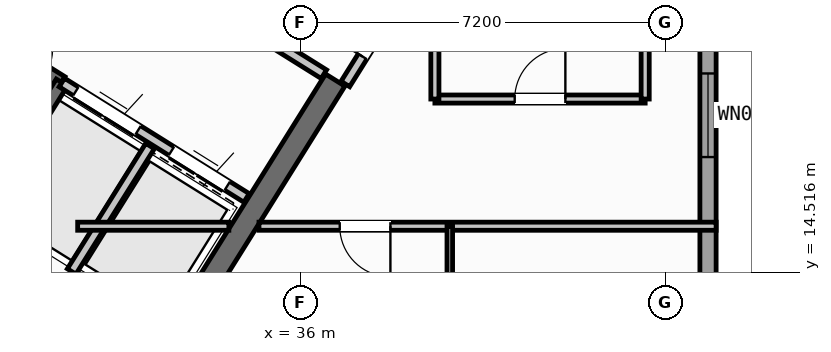
"""IFC4 building model, lengths in metres.
Left out: names, types, materials, properties, quantities, classifications, styles, units other than length and angle.
Written with IfcOpenShell. Run it as: python <this file> out.ifc"""

import sys

from ifc_helpers import new_model, si_unit, direction, frame, frame_2d, origin, place, context, subcontext, project, spatial, rectangle, extrude, source, transform, mapped, element, fill, save


model = new_model("IFC4")
c1 = context("Model", 3, precision=1e-05, world=origin(), true_north=direction((0.0, 1.0)))
c2 = subcontext(c1, "Body", "Model", "MODEL_VIEW")
j1 = project(units=[si_unit("LENGTHUNIT", "METRE"), si_unit("PLANEANGLEUNIT", "RADIAN")], contexts=[c1])
p1 = place(None, origin())
s1 = spatial("IfcSite", under=j1, at=p1, CompositionType="ELEMENT")
p2 = place(p1, origin())
s2 = spatial("IfcBuilding", under=s1, at=p2, CompositionType="ELEMENT")
p3 = place(p2, frame((0.0, 0.0, 277.2)))
s3 = spatial("IfcBuildingStorey", under=s2, at=p3, CompositionType="ELEMENT", Elevation=277.2)
p4 = place(p3, frame((33.324, 12.503, 0.0), z_axis=(0.0, 0.0, 1.0), x_axis=(-0.848043529849, 0.529926571782, 0.0)))
e1 = element("IfcWall", 1, at=p4, inside=s3, PredefinedType="SHEAR", context=c2, shape_type="SweptSolid", body=[
    extrude(rectangle(XDim=13.04, YDim=0.45, at=frame_2d((6.52, 0.0))), origin(), (0.0, 0.0, 1.0), 3.35),
])
p5 = place(p3, frame((36.683, 18.304, 0.0), z_axis=(0.0, 0.0, 1.0), x_axis=(-0.529904039071, -0.848057609704, 0.0)))
e2 = element("IfcWall", 2, at=p5, inside=s3, PredefinedType="SHEAR", context=c2, shape_type="SweptSolid", body=[
    extrude(rectangle(XDim=6.475, YDim=0.45, at=frame_2d((3.238, 0.0))), origin(), (0.0, 0.0, 1.0), 3.35),
])
p6 = place(p3, frame((44.04, 23.04, 0.0), z_axis=(0.0, 0.0, 1.0), x_axis=(0.0, -1.0, 0.0)))
e3 = element("IfcWall", 3, at=p6, inside=s3, PredefinedType="STANDARD", context=c2, shape_type="SweptSolid", body=[
    extrude(rectangle(XDim=21.08, YDim=0.32, at=frame_2d((10.54, 0.0))), origin(), (0.0, 0.0, 1.0), 3.35),
])
p7 = place(p6, frame((1.285, 0.0, 0.9)))
e4 = element("IfcOpeningElement", 4, at=p7, cuts=e3, PredefinedType="OPENING", context=c2, shape_type="SweptSolid", body=[
    extrude(rectangle(XDim=1.65, YDim=1.45, at=frame_2d((0.825, 0.725))), frame((0.0, 0.17, 0.0), z_axis=(0.0, -1.0, 0.0), x_axis=(1.0, 0.0, 0.0)), (0.0, 0.0, 1.0), 0.34),
])
p8 = place(p6, frame((4.605, 0.0, 0.9)))
e5 = element("IfcOpeningElement", 5, at=p8, cuts=e3, PredefinedType="OPENING", context=c2, shape_type="SweptSolid", body=[
    extrude(rectangle(XDim=1.65, YDim=1.45, at=frame_2d((0.825, 0.725))), frame((0.0, 0.17, 0.0), z_axis=(0.0, -1.0, 0.0), x_axis=(1.0, 0.0, 0.0)), (0.0, 0.0, 1.0), 0.34),
])
p9 = place(p6, frame((8.69, 0.0, 1.0)))
e6 = element("IfcOpeningElement", 6, at=p9, cuts=e3, PredefinedType="OPENING", context=c2, shape_type="SweptSolid", body=[
    extrude(rectangle(XDim=0.9, YDim=1.25, at=frame_2d((0.45, 0.625))), frame((0.0, 0.17, 0.0), z_axis=(0.0, -1.0, 0.0), x_axis=(1.0, 0.0, 0.0)), (0.0, 0.0, 1.0), 0.34),
])
p10 = place(p6, frame((11.949, 0.0, 1.0)))
e7 = element("IfcOpeningElement", 7, at=p10, cuts=e3, PredefinedType="OPENING", context=c2, shape_type="SweptSolid", body=[
    extrude(rectangle(XDim=0.9, YDim=1.25, at=frame_2d((0.45, 0.625))), frame((0.0, 0.17, 0.0), z_axis=(0.0, -1.0, 0.0), x_axis=(1.0, 0.0, 0.0)), (0.0, 0.0, 1.0), 0.34),
])
p11 = place(p6, frame((14.406, 0.0, 1.0)))
e8 = element("IfcOpeningElement", 8, at=p11, cuts=e3, PredefinedType="OPENING", context=c2, shape_type="SweptSolid", body=[
    extrude(rectangle(XDim=0.9, YDim=1.25, at=frame_2d((0.45, 0.625))), frame((0.0, 0.17, 0.0), z_axis=(0.0, -1.0, 0.0), x_axis=(1.0, 0.0, 0.0)), (0.0, 0.0, 1.0), 0.34),
])
p12 = place(p6, frame((18.188, 0.0, 0.9)))
e9 = element("IfcOpeningElement", 9, at=p12, cuts=e3, PredefinedType="OPENING", context=c2, shape_type="SweptSolid", body=[
    extrude(rectangle(XDim=1.35, YDim=1.45, at=frame_2d((0.675, 0.725))), frame((0.0, 0.17, 0.0), z_axis=(0.0, -1.0, 0.0), x_axis=(1.0, 0.0, 0.0)), (0.0, 0.0, 1.0), 0.34),
])
p13 = place(p3, frame((31.28, 18.261, 0.0), z_axis=(0.0, 0.0, 1.0), x_axis=(-0.848051618787, 0.529913626805, 0.0)))
e10 = element("IfcWall", 10, at=p13, inside=s3, PredefinedType="SHEAR", context=c2, shape_type="SweptSolid", body=[
    extrude(rectangle(XDim=7.46, YDim=0.26, at=frame_2d((3.73, 0.0))), origin(), (0.0, 0.0, 1.0), 3.35),
])
p14 = place(p13, frame((0.36, 0.0, 0.0)))
e11 = element("IfcOpeningElement", 11, at=p14, cuts=e10, PredefinedType="OPENING", context=c2, shape_type="SweptSolid", body=[
    extrude(rectangle(XDim=0.86, YDim=2.05, at=frame_2d((0.43, 1.025))), frame((0.0, 0.14, 0.0), z_axis=(0.0, -1.0, 0.0), x_axis=(1.0, 0.0, 0.0)), (0.0, 0.0, 1.0), 0.28),
])
p15 = place(p3, frame((31.288, 18.256, 0.0), z_axis=(0.0, 0.0, 1.0), x_axis=(-0.529943379326, -0.848033026897, 0.0)))
e12 = element("IfcWall", 12, at=p15, inside=s3, PredefinedType="SHEAR", context=c2, shape_type="SweptSolid", body=[
    extrude(rectangle(XDim=3.16, YDim=0.26, at=frame_2d((1.58, 0.0))), origin(), (0.0, 0.0, 1.0), 3.35),
])
p16 = place(p3, frame((34.933, 15.978, 0.0), z_axis=(0.0, 0.0, 1.0), x_axis=(-0.848055739377, 0.529907032327, 0.0)))
e13 = element("IfcWall", 13, at=p16, inside=s3, PredefinedType="STANDARD", context=c2, shape_type="SweptSolid", body=[
    extrude(rectangle(XDim=4.298, YDim=0.2, at=frame_2d((2.149, 0.0))), origin(), (0.0, 0.0, 1.0), 3.34),
])
p17 = place(p16, frame((0.448, 0.0, 0.0)))
e14 = element("IfcOpeningElement", 14, at=p17, cuts=e13, PredefinedType="OPENING", context=c2, shape_type="SweptSolid", body=[
    extrude(rectangle(XDim=1.3, YDim=2.2, at=frame_2d((0.65, 1.1))), frame((0.0, 0.11, 0.0), z_axis=(0.0, -1.0, 0.0), x_axis=(1.0, 0.0, 0.0)), (0.0, 0.0, 1.0), 0.22),
])
p18 = place(p16, frame((2.523, 0.0, 0.0)))
e15 = element("IfcOpeningElement", 15, at=p18, cuts=e13, PredefinedType="OPENING", context=c2, shape_type="SweptSolid", body=[
    extrude(rectangle(XDim=1.45, YDim=2.25, at=frame_2d((0.725, 1.125))), frame((0.0, 0.11, 0.0), z_axis=(0.0, -1.0, 0.0), x_axis=(1.0, 0.0, 0.0)), (0.0, 0.0, 1.0), 0.22),
])
p19 = place(p3, frame((36.459, 18.421, 0.0), z_axis=(0.0, 0.0, 1.0), x_axis=(-0.848059591691, 0.529900867089, 0.0)))
e16 = element("IfcWall", 16, at=p19, inside=s3, PredefinedType="STANDARD", context=c2, shape_type="SweptSolid", body=[
    extrude(rectangle(XDim=5.818, YDim=0.2, at=frame_2d((2.909, 0.0))), origin(), (0.0, 0.0, 1.0), 3.34),
])
p20 = place(p19, frame((2.598, 0.0, 0.0)))
e17 = element("IfcOpeningElement", 17, at=p20, cuts=e16, PredefinedType="OPENING", context=c2, shape_type="SweptSolid", body=[
    extrude(rectangle(XDim=1.15, YDim=2.1, at=frame_2d((0.575, 1.05))), frame((0.0, 0.11, 0.0), z_axis=(0.0, -1.0, 0.0), x_axis=(1.0, 0.0, 0.0)), (0.0, 0.0, 1.0), 0.22),
])
p21 = place(p3, frame((33.029, 17.003, 0.0), z_axis=(0.0, 0.0, 1.0), x_axis=(-0.529916267533, -0.848049968695, 0.0)))
e18 = element("IfcWall", 18, at=p21, inside=s3, PredefinedType="STANDARD", context=c2, shape_type="SweptSolid", body=[
    extrude(rectangle(XDim=2.92, YDim=0.2, at=frame_2d((1.46, 0.0))), origin(), (0.0, 0.0, 1.0), 3.34),
])
p22 = place(p3, frame((32.164, 10.374, 0.0), z_axis=(0.0, 0.0, 1.0), x_axis=(-0.848044107957, 0.529925646633, 0.0)))
e19 = element("IfcWall", 19, at=p22, inside=s3, PredefinedType="PARTITIONING", context=c2, shape_type="SweptSolid", body=[
    extrude(rectangle(XDim=15.57, YDim=0.16, at=frame_2d((7.785, 0.0))), origin(), (0.0, 0.0, 1.0), 3.34),
])
p23 = place(p22, frame((10.83, 0.0, 0.0)))
e20 = element("IfcOpeningElement", 20, at=p23, cuts=e19, PredefinedType="OPENING", context=c2, shape_type="SweptSolid", body=[
    extrude(rectangle(XDim=1.0, YDim=2.1, at=frame_2d((0.5, 1.05))), frame((0.0, 0.09, 0.0), z_axis=(0.0, -1.0, 0.0), x_axis=(1.0, 0.0, 0.0)), (0.0, 0.0, 1.0), 0.18),
])
p24 = place(p3, frame((38.451, 20.737, 0.0), z_axis=(0.0, 0.0, 1.0), x_axis=(-0.529924799939, -0.848044637038, 0.0)))
e21 = element("IfcWall", 21, at=p24, inside=s3, PredefinedType="STANDARD", context=c2, shape_type="SweptSolid", body=[
    extrude(rectangle(XDim=2.96, YDim=0.2, at=frame_2d((1.48, 0.0))), origin(), (0.0, 0.0, 1.0), 3.34),
])
p25 = place(p24, frame((1.46, 0.0, 0.0)))
e22 = element("IfcOpeningElement", 22, at=p25, cuts=e21, PredefinedType="OPENING", context=c2, shape_type="SweptSolid", body=[
    extrude(rectangle(XDim=0.86, YDim=2.05, at=frame_2d((0.43, 1.025))), frame((0.0, 0.11, 0.0), z_axis=(0.0, -1.0, 0.0), x_axis=(1.0, 0.0, 0.0)), (0.0, 0.0, 1.0), 0.22),
])
p26 = place(p3, frame((31.6, 15.42, 0.0), z_axis=(0.0, 0.0, 1.0), x_axis=(1.0, 0.0, 0.0)))
e23 = element("IfcWall", 23, at=p26, inside=s3, PredefinedType="PARTITIONING", context=c2, shape_type="SweptSolid", body=[
    extrude(rectangle(XDim=2.984, YDim=0.16, at=frame_2d((1.492, 0.0))), origin(), (0.0, 0.0, 1.0), 3.34),
])
p27 = place(p3, frame((35.178, 15.42, 0.0), z_axis=(0.0, 0.0, 1.0), x_axis=(1.0, 0.0, 0.0)))
e24 = element("IfcWall", 24, at=p27, inside=s3, PredefinedType="PARTITIONING", context=c2, shape_type="SweptSolid", body=[
    extrude(rectangle(XDim=9.021, YDim=0.16, at=frame_2d((4.511, 0.0))), origin(), (0.0, 0.0, 1.0), 3.34),
])
p28 = place(p27, frame((1.594, 0.0, 0.0)))
e25 = element("IfcOpeningElement", 25, at=p28, cuts=e24, PredefinedType="OPENING", context=c2, shape_type="SweptSolid", body=[
    extrude(rectangle(XDim=1.0, YDim=2.1, at=frame_2d((0.5, 1.05))), frame((0.0, 0.09, 0.0), z_axis=(0.0, -1.0, 0.0), x_axis=(1.0, 0.0, 0.0)), (0.0, 0.0, 1.0), 0.18),
])
p29 = place(p3, frame((38.65, 17.93, 0.0), z_axis=(0.0, 0.0, 1.0), x_axis=(1.0, 0.0, 0.0)))
e26 = element("IfcWall", 26, at=p29, inside=s3, PredefinedType="PARTITIONING", context=c2, shape_type="SweptSolid", body=[
    extrude(rectangle(XDim=4.15, YDim=0.16, at=frame_2d((2.075, 0.0))), origin(), (0.0, 0.0, 1.0), 3.34),
])
p30 = place(p29, frame((1.575, 0.0, 0.0)))
e27 = element("IfcOpeningElement", 27, at=p30, cuts=e26, PredefinedType="OPENING", context=c2, shape_type="SweptSolid", body=[
    extrude(rectangle(XDim=1.0, YDim=2.1, at=frame_2d((0.5, 1.05))), frame((0.0, 0.09, 0.0), z_axis=(0.0, -1.0, 0.0), x_axis=(1.0, 0.0, 0.0)), (0.0, 0.0, 1.0), 0.18),
])
p31 = place(p3, frame((38.65, 17.93, 0.0), z_axis=(0.0, 0.0, 1.0), x_axis=(0.0, 1.0, 0.0)))
e28 = element("IfcWall", 28, at=p31, inside=s3, PredefinedType="PARTITIONING", context=c2, shape_type="SweptSolid", body=[
    extrude(rectangle(XDim=3.046, YDim=0.16, at=frame_2d((1.523, 0.0))), origin(), (0.0, 0.0, 1.0), 3.34),
])
p32 = place(p3, frame((42.8, 17.93, 0.0), z_axis=(0.0, 0.0, 1.0), x_axis=(0.0, 1.0, 0.0)))
e29 = element("IfcWall", 29, at=p32, inside=s3, PredefinedType="PARTITIONING", context=c2, shape_type="SweptSolid", body=[
    extrude(rectangle(XDim=3.57, YDim=0.16, at=frame_2d((1.785, 0.0))), origin(), (0.0, 0.0, 1.0), 3.34),
])
p33 = place(p3, frame((38.944, 1.96, 0.0), z_axis=(0.0, 0.0, 1.0), x_axis=(0.0, 1.0, 0.0)))
e30 = element("IfcWall", 30, at=p33, inside=s3, PredefinedType="PARTITIONING", context=c2, shape_type="SweptSolid", body=[
    extrude(rectangle(XDim=13.46, YDim=0.11, at=frame_2d((6.73, 0.0))), origin(), (0.0, 0.0, 1.0), 3.34),
])
p34 = place(p33, frame((5.5, 0.0, 0.0)))
e31 = element("IfcOpeningElement", 31, at=p34, cuts=e30, PredefinedType="OPENING", context=c2, shape_type="SweptSolid", body=[
    extrude(rectangle(XDim=0.92, YDim=2.08, at=frame_2d((0.46, 1.04))), frame((0.0, 0.065, 0.0), z_axis=(0.0, -1.0, 0.0), x_axis=(1.0, 0.0, 0.0)), (0.0, 0.0, 1.0), 0.13),
])
p35 = place(p33, frame((10.89, 0.0, 0.0)))
e32 = element("IfcOpeningElement", 32, at=p35, cuts=e30, PredefinedType="OPENING", context=c2, shape_type="SweptSolid", body=[
    extrude(rectangle(XDim=0.88, YDim=2.08, at=frame_2d((0.44, 1.04))), frame((0.0, 0.065, 0.0), z_axis=(0.0, -1.0, 0.0), x_axis=(1.0, 0.0, 0.0)), (0.0, 0.0, 1.0), 0.13),
])
m1 = source(origin(), c2, "Body", "SweptSolid", [
    extrude(rectangle(XDim=1.65, YDim=1.45, at=frame_2d((0.825, 0.725))), frame((0.0, 0.03, 0.0), z_axis=(0.0, -1.0, 0.0), x_axis=(1.0, 0.0, 0.0)), (0.0, 0.0, 1.0), 0.06),
])
p36 = place(p8, origin())
e33 = element("IfcWindow", 33, at=p36, inside=s3, PartitioningType="SINGLE_PANEL", PredefinedType="WINDOW", context=c2, shape_type="MappedRepresentation", body=[
    mapped(m1, transform((0.0, 0.0, 0.0), scale=1.0)),
])
fill(e5, e33)
m2 = source(origin(), c2, "Body", "SweptSolid", [
    extrude(rectangle(XDim=1.3, YDim=2.2, at=frame_2d((0.65, 1.1))), frame((0.0, 0.025, 0.0), z_axis=(0.0, -1.0, 0.0), x_axis=(1.0, 0.0, 0.0)), (0.0, 0.0, 1.0), 0.05),
])
p37 = place(p17, origin())
e34 = element("IfcDoor", 34, at=p37, inside=s3, OperationType="DOUBLE_DOOR_SLIDING", PredefinedType="DOOR", context=c2, shape_type="MappedRepresentation", body=[
    mapped(m2, transform((0.0, 0.0, 0.0), scale=1.0)),
])
fill(e14, e34)
m3 = source(origin(), c2, "Body", "SweptSolid", [
    extrude(rectangle(XDim=1.45, YDim=2.25, at=frame_2d((0.725, 1.125))), frame((0.0, 0.025, 0.0), z_axis=(0.0, -1.0, 0.0), x_axis=(1.0, 0.0, 0.0)), (0.0, 0.0, 1.0), 0.05),
])
p38 = place(p18, origin())
e35 = element("IfcDoor", 35, at=p38, inside=s3, OperationType="DOUBLE_DOOR_SLIDING", PredefinedType="DOOR", context=c2, shape_type="MappedRepresentation", body=[
    mapped(m3, transform((0.0, 0.0, 0.0), scale=1.0)),
])
fill(e15, e35)
m4 = source(origin(), c2, "Body", "SweptSolid", [
    extrude(rectangle(XDim=1.0, YDim=2.1, at=frame_2d((0.5, 1.05))), frame((0.0, 0.025, 0.0), z_axis=(0.0, -1.0, 0.0), x_axis=(1.0, 0.0, 0.0)), (0.0, 0.0, 1.0), 0.05),
])
p39 = place(p30, origin())
e36 = element("IfcDoor", 36, at=p39, inside=s3, OperationType="SINGLE_SWING_RIGHT", PredefinedType="DOOR", context=c2, shape_type="MappedRepresentation", body=[
    mapped(m4, transform((0.0, 0.0, 0.0), scale=1.0)),
])
fill(e27, e36)
m5 = source(origin(), c2, "Body", "SweptSolid", [
    extrude(rectangle(XDim=0.86, YDim=2.05, at=frame_2d((0.43, 1.025))), frame((0.0, 0.025, 0.0), z_axis=(0.0, -1.0, 0.0), x_axis=(1.0, 0.0, 0.0)), (0.0, 0.0, 1.0), 0.05),
])
p40 = place(p25, frame((0.86, 0.0, 0.0), z_axis=(0.0, 0.0, 1.0), x_axis=(-1.0, 0.0, 0.0)))
e37 = element("IfcDoor", 37, at=p40, inside=s3, OperationType="SINGLE_SWING_LEFT", PredefinedType="DOOR", context=c2, shape_type="MappedRepresentation", body=[
    mapped(m5, transform((0.0, 0.0, 0.0), scale=1.0)),
])
fill(e22, e37)
p41 = place(p28, frame((1.0, 0.0, 0.0), z_axis=(0.0, 0.0, 1.0), x_axis=(-1.0, 0.0, 0.0)))
e38 = element("IfcDoor", 38, at=p41, inside=s3, OperationType="SINGLE_SWING_LEFT", PredefinedType="DOOR", context=c2, shape_type="MappedRepresentation", body=[
    mapped(m4, transform((0.0, 0.0, 0.0), scale=1.0)),
])
fill(e25, e38)
save(model, sys.argv[1])
